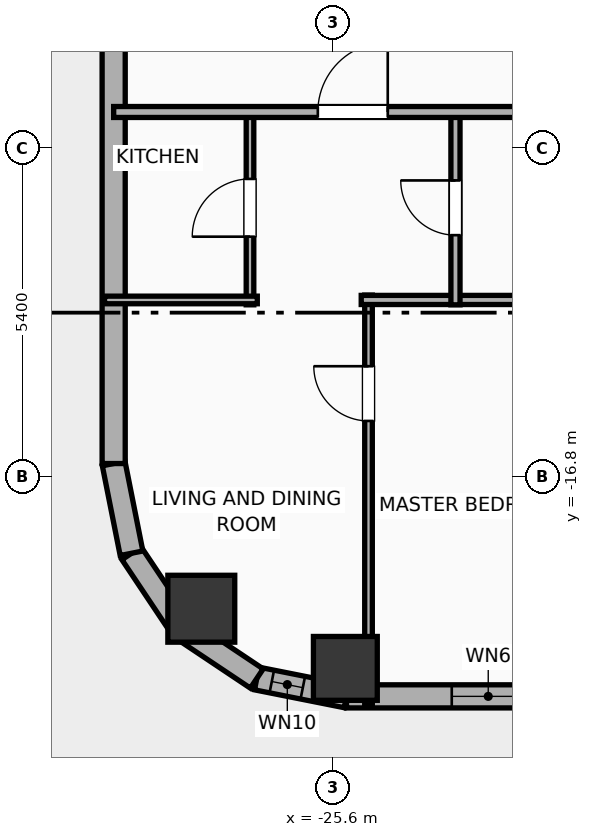
"""IFC4 building model, lengths in metres.
Left out: names, types, materials, properties, quantities, classifications, styles, units other than length and angle.
Written with IfcOpenShell. Run it as: python <this file> out.ifc"""

import sys

from ifc_helpers import new_model, si_unit, direction, frame, frame_2d, origin, origin_2d, place, context, subcontext, project, spatial, rectangle, hollow_rectangle, hollow_circle, extrude, element, fill, save


model = new_model("IFC4")
c1 = context("Model", 3, precision=1e-05, world=origin(), true_north=direction((0.0, 1.0)))
c2 = subcontext(c1, "Body", "Model", "MODEL_VIEW")
j1 = project(units=[si_unit("LENGTHUNIT", "METRE"), si_unit("PLANEANGLEUNIT", "RADIAN")], contexts=[c1])
p1 = place(None, origin())
s1 = spatial("IfcSite", under=j1, at=p1, CompositionType="ELEMENT")
p2 = place(p1, origin())
s2 = spatial("IfcBuilding", under=s1, at=p2, CompositionType="ELEMENT")
p3 = place(p2, frame((0.0, 0.0, 85.8)))
s3 = spatial("IfcBuildingStorey", under=s2, at=p3, CompositionType="ELEMENT", Elevation=85.8)
p4 = place(p3, frame((-25.4, -19.95, -0.4), z_axis=(0.0, 0.0, 1.0), x_axis=(1.0, 0.0, 0.0)))
e1 = element("IfcColumn", 1, at=p4, inside=s3, PredefinedType="COLUMN", context=c2, shape_type="SweptSolid", body=[
    extrude(hollow_rectangle(XDim=1.05, YDim=1.05, WallThickness=0.036, at=origin_2d()), origin(), (0.0, 0.0, 1.0), 4.3),
])
p5 = place(p3, frame((-27.769, -18.969, -0.4), z_axis=(0.0, 0.0, 1.0), x_axis=(1.0, 0.0, 0.0)))
e2 = element("IfcColumn", 2, at=p5, inside=s3, PredefinedType="COLUMN", context=c2, shape_type="SweptSolid", body=[
    extrude(hollow_circle(Radius=0.55, WallThickness=0.036, at=origin_2d()), origin(), (0.0, 0.0, 1.0), 4.3),
])
p6 = place(p3, frame((29.381, -20.41, 0.0), z_axis=(0.0, 0.0, 1.0), x_axis=(-1.0, 0.0, 0.0)))
e3 = element("IfcWall", 3, at=p6, inside=s3, PredefinedType="ELEMENTEDWALL", context=c2, shape_type="SweptSolid", body=[
    extrude(rectangle(XDim=54.763, YDim=0.38, at=frame_2d((27.381, 0.0))), origin(), (0.0, 0.0, 1.0), 2.54),
])
p7 = place(p6, frame((18.486, 0.0, 0.75)))
e4 = element("IfcOpeningElement", 4, at=p7, cuts=e3, PredefinedType="OPENING", context=c2, shape_type="SweptSolid", body=[
    extrude(rectangle(XDim=2.4, YDim=1.45, at=frame_2d((1.2, 0.725))), frame((0.0, 0.2, 0.0), z_axis=(0.0, -1.0, 0.0), x_axis=(1.0, 0.0, 0.0)), (0.0, 0.0, 1.0), 0.4),
])
p8 = place(p6, frame((47.567, 0.0, 0.75)))
e5 = element("IfcOpeningElement", 5, at=p8, cuts=e3, PredefinedType="OPENING", context=c2, shape_type="SweptSolid", body=[
    extrude(rectangle(XDim=2.4, YDim=1.45, at=frame_2d((1.2, 0.725))), frame((0.0, 0.2, 0.0), z_axis=(0.0, -1.0, 0.0), x_axis=(1.0, 0.0, 0.0)), (0.0, 0.0, 1.0), 0.4),
])
p9 = place(p6, frame((7.464, 0.0, 0.0)))
e6 = element("IfcOpeningElement", 6, at=p9, cuts=e3, PredefinedType="OPENING", context=c2, shape_type="SweptSolid", body=[
    extrude(rectangle(XDim=1.5, YDim=2.05, at=frame_2d((0.75, 1.025))), frame((0.0, 0.2, 0.0), z_axis=(0.0, -1.0, 0.0), x_axis=(1.0, 0.0, 0.0)), (0.0, 0.0, 1.0), 0.4),
])
p10 = place(p6, frame((51.831, 0.0, 0.55)))
e7 = element("IfcOpeningElement", 7, at=p10, cuts=e3, PredefinedType="OPENING", context=c2, shape_type="SweptSolid", body=[
    extrude(rectangle(XDim=1.2, YDim=1.15, at=frame_2d((0.6, 0.575))), frame((0.0, 0.2, 0.0), z_axis=(0.0, -1.0, 0.0), x_axis=(1.0, 0.0, 0.0)), (0.0, 0.0, 1.0), 0.4),
])
p11 = place(p6, frame((44.606, 0.0, 0.55)))
e8 = element("IfcOpeningElement", 8, at=p11, cuts=e3, PredefinedType="OPENING", context=c2, shape_type="SweptSolid", body=[
    extrude(rectangle(XDim=1.2, YDim=1.15, at=frame_2d((0.6, 0.575))), frame((0.0, 0.2, 0.0), z_axis=(0.0, -1.0, 0.0), x_axis=(1.0, 0.0, 0.0)), (0.0, 0.0, 1.0), 0.4),
])
p12 = place(p6, frame((38.906, 0.0, 0.55)))
e9 = element("IfcOpeningElement", 9, at=p12, cuts=e3, PredefinedType="OPENING", context=c2, shape_type="SweptSolid", body=[
    extrude(rectangle(XDim=1.2, YDim=1.15, at=frame_2d((0.6, 0.575))), frame((0.0, 0.2, 0.0), z_axis=(0.0, -1.0, 0.0), x_axis=(1.0, 0.0, 0.0)), (0.0, 0.0, 1.0), 0.4),
])
p13 = place(p6, frame((41.656, 0.0, 0.55)))
e10 = element("IfcOpeningElement", 10, at=p13, cuts=e3, PredefinedType="OPENING", context=c2, shape_type="SweptSolid", body=[
    extrude(rectangle(XDim=1.2, YDim=1.15, at=frame_2d((0.6, 0.575))), frame((0.0, 0.2, 0.0), z_axis=(0.0, -1.0, 0.0), x_axis=(1.0, 0.0, 0.0)), (0.0, 0.0, 1.0), 0.4),
])
p14 = place(p6, frame((33.666, 0.0, 0.55)))
e11 = element("IfcOpeningElement", 11, at=p14, cuts=e3, PredefinedType="OPENING", context=c2, shape_type="SweptSolid", body=[
    extrude(rectangle(XDim=1.2, YDim=1.15, at=frame_2d((0.6, 0.575))), frame((0.0, 0.2, 0.0), z_axis=(0.0, -1.0, 0.0), x_axis=(1.0, 0.0, 0.0)), (0.0, 0.0, 1.0), 0.4),
])
p15 = place(p6, frame((36.176, 0.0, 0.55)))
e12 = element("IfcOpeningElement", 12, at=p15, cuts=e3, PredefinedType="OPENING", context=c2, shape_type="SweptSolid", body=[
    extrude(rectangle(XDim=1.2, YDim=1.15, at=frame_2d((0.6, 0.575))), frame((0.0, 0.2, 0.0), z_axis=(0.0, -1.0, 0.0), x_axis=(1.0, 0.0, 0.0)), (0.0, 0.0, 1.0), 0.4),
])
p16 = place(p6, frame((27.861, 0.0, 0.55)))
e13 = element("IfcOpeningElement", 13, at=p16, cuts=e3, PredefinedType="OPENING", context=c2, shape_type="SweptSolid", body=[
    extrude(rectangle(XDim=1.2, YDim=1.15, at=frame_2d((0.6, 0.575))), frame((0.0, 0.2, 0.0), z_axis=(0.0, -1.0, 0.0), x_axis=(1.0, 0.0, 0.0)), (0.0, 0.0, 1.0), 0.4),
])
p17 = place(p6, frame((30.611, 0.0, 0.55)))
e14 = element("IfcOpeningElement", 14, at=p17, cuts=e3, PredefinedType="OPENING", context=c2, shape_type="SweptSolid", body=[
    extrude(rectangle(XDim=1.2, YDim=1.15, at=frame_2d((0.6, 0.575))), frame((0.0, 0.2, 0.0), z_axis=(0.0, -1.0, 0.0), x_axis=(1.0, 0.0, 0.0)), (0.0, 0.0, 1.0), 0.4),
])
p18 = place(p6, frame((23.531, 0.0, 0.55)))
e15 = element("IfcOpeningElement", 15, at=p18, cuts=e3, PredefinedType="OPENING", context=c2, shape_type="SweptSolid", body=[
    extrude(rectangle(XDim=1.2, YDim=1.15, at=frame_2d((0.6, 0.575))), frame((0.0, 0.2, 0.0), z_axis=(0.0, -1.0, 0.0), x_axis=(1.0, 0.0, 0.0)), (0.0, 0.0, 1.0), 0.4),
])
p19 = place(p6, frame((16.386, 0.0, 0.55)))
e16 = element("IfcOpeningElement", 16, at=p19, cuts=e3, PredefinedType="OPENING", context=c2, shape_type="SweptSolid", body=[
    extrude(rectangle(XDim=1.2, YDim=1.15, at=frame_2d((0.6, 0.575))), frame((0.0, 0.2, 0.0), z_axis=(0.0, -1.0, 0.0), x_axis=(1.0, 0.0, 0.0)), (0.0, 0.0, 1.0), 0.4),
])
p20 = place(p6, frame((12.531, 0.0, 0.55)))
e17 = element("IfcOpeningElement", 17, at=p20, cuts=e3, PredefinedType="OPENING", context=c2, shape_type="SweptSolid", body=[
    extrude(rectangle(XDim=1.2, YDim=1.15, at=frame_2d((0.6, 0.575))), frame((0.0, 0.2, 0.0), z_axis=(0.0, -1.0, 0.0), x_axis=(1.0, 0.0, 0.0)), (0.0, 0.0, 1.0), 0.4),
])
p21 = place(p6, frame((4.377, 0.0, 0.55)))
e18 = element("IfcOpeningElement", 18, at=p21, cuts=e3, PredefinedType="OPENING", context=c2, shape_type="SweptSolid", body=[
    extrude(rectangle(XDim=1.2, YDim=1.15, at=frame_2d((0.6, 0.575))), frame((0.0, 0.2, 0.0), z_axis=(0.0, -1.0, 0.0), x_axis=(1.0, 0.0, 0.0)), (0.0, 0.0, 1.0), 0.4),
])
p22 = place(p6, frame((1.481, 0.0, 0.55)))
e19 = element("IfcOpeningElement", 19, at=p22, cuts=e3, PredefinedType="OPENING", context=c2, shape_type="SweptSolid", body=[
    extrude(rectangle(XDim=1.2, YDim=1.15, at=frame_2d((0.6, 0.575))), frame((0.0, 0.2, 0.0), z_axis=(0.0, -1.0, 0.0), x_axis=(1.0, 0.0, 0.0)), (0.0, 0.0, 1.0), 0.4),
])
p23 = place(p3, frame((-25.381, -20.41, 0.0), z_axis=(0.0, 0.0, 1.0), x_axis=(-0.980786132421, 0.195086038585, 0.0)))
e20 = element("IfcWall", 20, at=p23, inside=s3, PredefinedType="ELEMENTEDWALL", context=c2, shape_type="SweptSolid", body=[
    extrude(rectangle(XDim=1.504, YDim=0.38, at=frame_2d((0.752, 0.0))), origin(), (0.0, 0.0, 1.0), 2.54),
])
p24 = place(p23, frame((0.732, 0.0, 0.55)))
e21 = element("IfcOpeningElement", 21, at=p24, cuts=e20, PredefinedType="OPENING", context=c2, shape_type="SweptSolid", body=[
    extrude(rectangle(XDim=0.52, YDim=1.15, at=frame_2d((0.26, 0.575))), frame((0.0, 0.2, 0.0), z_axis=(0.0, -1.0, 0.0), x_axis=(1.0, 0.0, 0.0)), (0.0, 0.0, 1.0), 0.4),
])
p25 = place(p3, frame((-26.857, -20.116, 0.0), z_axis=(0.0, 0.0, 1.0), x_axis=(-0.831468045563, 0.555572577804, 0.0)))
e22 = element("IfcWall", 22, at=p25, inside=s3, PredefinedType="ELEMENTEDWALL", context=c2, shape_type="SweptSolid", body=[
    extrude(rectangle(XDim=1.485, YDim=0.38, at=frame_2d((0.742, 0.0))), origin(), (0.0, 0.0, 1.0), 2.54),
])
p26 = place(p3, frame((-28.091, -19.292, 0.0), z_axis=(0.0, 0.0, 1.0), x_axis=(-0.555610286119, 0.831442848281, 0.0)))
e23 = element("IfcWall", 23, at=p26, inside=s3, PredefinedType="ELEMENTEDWALL", context=c2, shape_type="SweptSolid", body=[
    extrude(rectangle(XDim=1.485, YDim=0.38, at=frame_2d((0.743, 0.0))), origin(), (0.0, 0.0, 1.0), 3.65),
])
p27 = place(p3, frame((-28.917, -18.057, 0.0), z_axis=(0.0, 0.0, 1.0), x_axis=(-0.195086038585, 0.980786132421, 0.0)))
e24 = element("IfcWall", 24, at=p27, inside=s3, PredefinedType="ELEMENTEDWALL", context=c2, shape_type="SweptSolid", body=[
    extrude(rectangle(XDim=1.504, YDim=0.38, at=frame_2d((0.752, 0.0))), origin(), (0.0, 0.0, 1.0), 3.65),
])
p28 = place(p3, frame((-29.21, -16.581, 0.0), z_axis=(0.0, 0.0, 1.0), x_axis=(0.0, 1.0, 0.0)))
e25 = element("IfcWall", 25, at=p28, inside=s3, PredefinedType="ELEMENTEDWALL", context=c2, shape_type="SweptSolid", body=[
    extrude(rectangle(XDim=34.363, YDim=0.38, at=frame_2d((17.181, 0.0))), origin(), (0.0, 0.0, 1.0), 2.54),
])
p29 = place(p28, frame((31.437, 0.0, 0.55)))
e26 = element("IfcOpeningElement", 26, at=p29, cuts=e25, PredefinedType="OPENING", context=c2, shape_type="SweptSolid", body=[
    extrude(rectangle(XDim=1.2, YDim=1.15, at=frame_2d((0.6, 0.575))), frame((0.0, 0.2, 0.0), z_axis=(0.0, -1.0, 0.0), x_axis=(1.0, 0.0, 0.0)), (0.0, 0.0, 1.0), 0.4),
])
p30 = place(p28, frame((21.976, 0.0, 0.55)))
e27 = element("IfcOpeningElement", 27, at=p30, cuts=e25, PredefinedType="OPENING", context=c2, shape_type="SweptSolid", body=[
    extrude(rectangle(XDim=1.2, YDim=1.15, at=frame_2d((0.6, 0.575))), frame((0.0, 0.2, 0.0), z_axis=(0.0, -1.0, 0.0), x_axis=(1.0, 0.0, 0.0)), (0.0, 0.0, 1.0), 0.4),
])
p31 = place(p28, frame((10.561, 0.0, 0.55)))
e28 = element("IfcOpeningElement", 28, at=p31, cuts=e25, PredefinedType="OPENING", context=c2, shape_type="SweptSolid", body=[
    extrude(rectangle(XDim=1.2, YDim=1.15, at=frame_2d((0.6, 0.575))), frame((0.0, 0.2, 0.0), z_axis=(0.0, -1.0, 0.0), x_axis=(1.0, 0.0, 0.0)), (0.0, 0.0, 1.0), 0.4),
])
p32 = place(p3, frame((-25.019, -20.56, 0.0), z_axis=(0.0, 0.0, 1.0), x_axis=(0.0, 1.0, 0.0)))
e29 = element("IfcWall", 29, at=p32, inside=s3, PredefinedType="PARTITIONING", context=c2, shape_type="SweptSolid", body=[
    extrude(rectangle(XDim=6.749, YDim=0.125, at=frame_2d((3.375, 0.0))), origin(), (0.0, 0.0, 1.0), 3.65),
])
p33 = place(p32, frame((4.679, 0.0, 0.0)))
e30 = element("IfcOpeningElement", 30, at=p33, cuts=e29, PredefinedType="OPENING", context=c2, shape_type="SweptSolid", body=[
    extrude(rectangle(XDim=0.9, YDim=2.05, at=frame_2d((0.45, 1.025))), frame((0.0, 0.073, 0.0), z_axis=(0.0, -1.0, 0.0), x_axis=(1.0, 0.0, 0.0)), (0.0, 0.0, 1.0), 0.145),
])
p34 = place(p3, frame((-25.139, -13.891, 0.0), z_axis=(0.0, 0.0, 1.0), x_axis=(1.0, 0.0, 0.0)))
e31 = element("IfcWall", 31, at=p34, inside=s3, PredefinedType="PLUMBINGWALL", context=c2, shape_type="SweptSolid", body=[
    extrude(rectangle(XDim=3.79, YDim=0.15, at=frame_2d((1.895, 0.0))), origin(), (0.0, 0.0, 1.0), 3.65),
])
p35 = place(p3, frame((-26.968, -13.971, 0.0), z_axis=(0.0, 0.0, 1.0), x_axis=(0.0, 1.0, 0.0)))
e32 = element("IfcWall", 32, at=p35, inside=s3, PredefinedType="PARTITIONING", context=c2, shape_type="SweptSolid", body=[
    extrude(rectangle(XDim=3.191, YDim=0.125, at=frame_2d((1.595, 0.0))), origin(), (0.0, 0.0, 1.0), 3.65),
])
p36 = place(p35, frame((1.121, 0.0, 0.0)))
e33 = element("IfcOpeningElement", 33, at=p36, cuts=e32, PredefinedType="OPENING", context=c2, shape_type="SweptSolid", body=[
    extrude(rectangle(XDim=0.95, YDim=2.05, at=frame_2d((0.475, 1.025))), frame((0.0, 0.073, 0.0), z_axis=(0.0, -1.0, 0.0), x_axis=(1.0, 0.0, 0.0)), (0.0, 0.0, 1.0), 0.145),
])
p37 = place(p3, frame((-29.36, -13.891, 0.0), z_axis=(0.0, 0.0, 1.0), x_axis=(1.0, 0.0, 0.0)))
e34 = element("IfcWall", 34, at=p37, inside=s3, PredefinedType="PARTITIONING", context=c2, shape_type="SweptSolid", body=[
    extrude(rectangle(XDim=2.512, YDim=0.125, at=frame_2d((1.256, 0.0))), origin(), (0.0, 0.0, 1.0), 3.65),
])
p38 = place(p3, frame((-23.589, -13.971, 0.0), z_axis=(0.0, 0.0, 1.0), x_axis=(0.0, 1.0, 0.0)))
e35 = element("IfcWall", 35, at=p38, inside=s3, PredefinedType="PLUMBINGWALL", context=c2, shape_type="SweptSolid", body=[
    extrude(rectangle(XDim=3.191, YDim=0.15, at=frame_2d((1.595, 0.0))), origin(), (0.0, 0.0, 1.0), 3.65),
])
p39 = place(p38, frame((1.146, 0.0, 0.0)))
e36 = element("IfcOpeningElement", 36, at=p39, cuts=e35, PredefinedType="OPENING", context=c2, shape_type="SweptSolid", body=[
    extrude(rectangle(XDim=0.9, YDim=2.05, at=frame_2d((0.45, 1.025))), frame((0.0, 0.085, 0.0), z_axis=(0.0, -1.0, 0.0), x_axis=(1.0, 0.0, 0.0)), (0.0, 0.0, 1.0), 0.17),
])
p40 = place(p3, frame((-29.21, -10.8, 0.0), z_axis=(0.0, 0.0, 1.0), x_axis=(1.0, 0.0, 0.0)))
e37 = element("IfcWall", 37, at=p40, inside=s3, PredefinedType="PARTITIONING", context=c2, shape_type="SweptSolid", body=[
    extrude(rectangle(XDim=62.42, YDim=0.18, at=frame_2d((31.21, 0.0))), origin(), (0.0, 0.0, 1.0), 3.65),
])
p41 = place(p40, frame((3.357, 0.0, 0.0)))
e38 = element("IfcOpeningElement", 38, at=p41, cuts=e37, PredefinedType="OPENING", context=c2, shape_type="SweptSolid", body=[
    extrude(rectangle(XDim=1.15, YDim=2.05, at=frame_2d((0.575, 1.025))), frame((0.0, 0.1, 0.0), z_axis=(0.0, -1.0, 0.0), x_axis=(1.0, 0.0, 0.0)), (0.0, 0.0, 1.0), 0.2),
])
p42 = place(p40, frame((10.998, 0.0, 0.0)))
e39 = element("IfcOpeningElement", 39, at=p42, cuts=e37, PredefinedType="OPENING", context=c2, shape_type="SweptSolid", body=[
    extrude(rectangle(XDim=1.15, YDim=2.05, at=frame_2d((0.575, 1.025))), frame((0.0, 0.1, 0.0), z_axis=(0.0, -1.0, 0.0), x_axis=(1.0, 0.0, 0.0)), (0.0, 0.0, 1.0), 0.2),
])
p43 = place(p40, frame((18.482, 0.0, 0.0)))
e40 = element("IfcOpeningElement", 40, at=p43, cuts=e37, PredefinedType="OPENING", context=c2, shape_type="SweptSolid", body=[
    extrude(rectangle(XDim=1.15, YDim=2.05, at=frame_2d((0.575, 1.025))), frame((0.0, 0.1, 0.0), z_axis=(0.0, -1.0, 0.0), x_axis=(1.0, 0.0, 0.0)), (0.0, 0.0, 1.0), 0.2),
])
p44 = place(p40, frame((23.962, 0.0, 0.0)))
e41 = element("IfcOpeningElement", 41, at=p44, cuts=e37, PredefinedType="OPENING", context=c2, shape_type="SweptSolid", body=[
    extrude(rectangle(XDim=1.15, YDim=2.05, at=frame_2d((0.575, 1.025))), frame((0.0, 0.1, 0.0), z_axis=(0.0, -1.0, 0.0), x_axis=(1.0, 0.0, 0.0)), (0.0, 0.0, 1.0), 0.2),
])
p45 = place(p40, frame((29.524, 0.0, 0.0)))
e42 = element("IfcOpeningElement", 42, at=p45, cuts=e37, PredefinedType="OPENING", context=c2, shape_type="SweptSolid", body=[
    extrude(rectangle(XDim=1.15, YDim=2.05, at=frame_2d((0.575, 1.025))), frame((0.0, 0.1, 0.0), z_axis=(0.0, -1.0, 0.0), x_axis=(1.0, 0.0, 0.0)), (0.0, 0.0, 1.0), 0.2),
])
p46 = place(p40, frame((34.218, 0.0, 0.0)))
e43 = element("IfcOpeningElement", 43, at=p46, cuts=e37, PredefinedType="OPENING", context=c2, shape_type="SweptSolid", body=[
    extrude(rectangle(XDim=0.9, YDim=2.05, at=frame_2d((0.45, 1.025))), frame((0.0, 0.1, 0.0), z_axis=(0.0, -1.0, 0.0), x_axis=(1.0, 0.0, 0.0)), (0.0, 0.0, 1.0), 0.2),
])
p47 = place(p40, frame((38.313, 0.0, 0.0)))
e44 = element("IfcOpeningElement", 44, at=p47, cuts=e37, PredefinedType="OPENING", context=c2, shape_type="SweptSolid", body=[
    extrude(rectangle(XDim=1.15, YDim=2.05, at=frame_2d((0.575, 1.025))), frame((0.0, 0.1, 0.0), z_axis=(0.0, -1.0, 0.0), x_axis=(1.0, 0.0, 0.0)), (0.0, 0.0, 1.0), 0.2),
])
p48 = place(p40, frame((45.223, 0.0, 0.0)))
e45 = element("IfcOpeningElement", 45, at=p48, cuts=e37, PredefinedType="OPENING", context=c2, shape_type="SweptSolid", body=[
    extrude(rectangle(XDim=0.9, YDim=2.05, at=frame_2d((0.45, 1.025))), frame((0.0, 0.1, 0.0), z_axis=(0.0, -1.0, 0.0), x_axis=(1.0, 0.0, 0.0)), (0.0, 0.0, 1.0), 0.2),
])
p49 = place(p40, frame((51.352, 0.0, 0.0)))
e46 = element("IfcOpeningElement", 46, at=p49, cuts=e37, PredefinedType="OPENING", context=c2, shape_type="SweptSolid", body=[
    extrude(rectangle(XDim=1.15, YDim=2.05, at=frame_2d((0.575, 1.025))), frame((0.0, 0.1, 0.0), z_axis=(0.0, -1.0, 0.0), x_axis=(1.0, 0.0, 0.0)), (0.0, 0.0, 1.0), 0.2),
])
p50 = place(p40, frame((58.493, 0.0, 0.0)))
e47 = element("IfcOpeningElement", 47, at=p50, cuts=e37, PredefinedType="OPENING", context=c2, shape_type="SweptSolid", body=[
    extrude(rectangle(XDim=1.15, YDim=2.05, at=frame_2d((0.575, 1.025))), frame((0.0, 0.1, 0.0), z_axis=(0.0, -1.0, 0.0), x_axis=(1.0, 0.0, 0.0)), (0.0, 0.0, 1.0), 0.2),
])
p51 = place(p24, origin())
e48 = element("IfcWindow", 48, at=p51, inside=s3, PartitioningType="SINGLE_PANEL", PredefinedType="WINDOW", context=c2, shape_type="SweptSolid", body=[
    extrude(rectangle(XDim=0.52, YDim=1.15, at=frame_2d((0.26, 0.575))), frame((0.0, 0.03, 0.0), z_axis=(0.0, -1.0, 0.0), x_axis=(1.0, 0.0, 0.0)), (0.0, 0.0, 1.0), 0.06),
])
fill(e21, e48)
p52 = place(p10, origin())
e49 = element("IfcWindow", 49, at=p52, inside=s3, PartitioningType="SINGLE_PANEL", PredefinedType="WINDOW", context=c2, shape_type="SweptSolid", body=[
    extrude(rectangle(XDim=1.2, YDim=1.15, at=frame_2d((0.6, 0.575))), frame((0.0, 0.03, 0.0), z_axis=(0.0, -1.0, 0.0), x_axis=(1.0, 0.0, 0.0)), (0.0, 0.0, 1.0), 0.06),
])
fill(e7, e49)
p53 = place(p33, origin())
e50 = element("IfcDoor", 50, at=p53, inside=s3, OperationType="SINGLE_SWING_RIGHT", PredefinedType="DOOR", context=c2, shape_type="SweptSolid", body=[
    extrude(rectangle(XDim=0.9, YDim=2.05, at=frame_2d((0.45, 1.025))), frame((0.0, 0.025, 0.0), z_axis=(0.0, -1.0, 0.0), x_axis=(1.0, 0.0, 0.0)), (0.0, 0.0, 1.0), 0.05),
])
fill(e30, e50)
p54 = place(p36, origin())
e51 = element("IfcDoor", 51, at=p54, inside=s3, OperationType="SINGLE_SWING_LEFT", PredefinedType="DOOR", context=c2, shape_type="SweptSolid", body=[
    extrude(rectangle(XDim=0.95, YDim=2.05, at=frame_2d((0.475, 1.025))), frame((0.0, 0.025, 0.0), z_axis=(0.0, -1.0, 0.0), x_axis=(1.0, 0.0, 0.0)), (0.0, 0.0, 1.0), 0.05),
])
fill(e33, e51)
p55 = place(p39, origin())
e52 = element("IfcDoor", 52, at=p55, inside=s3, OperationType="SINGLE_SWING_RIGHT", PredefinedType="DOOR", context=c2, shape_type="SweptSolid", body=[
    extrude(rectangle(XDim=0.9, YDim=2.05, at=frame_2d((0.45, 1.025))), frame((0.0, 0.025, 0.0), z_axis=(0.0, -1.0, 0.0), x_axis=(1.0, 0.0, 0.0)), (0.0, 0.0, 1.0), 0.05),
])
fill(e36, e52)
p56 = place(p41, origin())
e53 = element("IfcDoor", 53, at=p56, inside=s3, OperationType="SINGLE_SWING_RIGHT", PredefinedType="DOOR", context=c2, shape_type="SweptSolid", body=[
    extrude(rectangle(XDim=1.15, YDim=2.05, at=frame_2d((0.575, 1.025))), frame((0.0, 0.025, 0.0), z_axis=(0.0, -1.0, 0.0), x_axis=(1.0, 0.0, 0.0)), (0.0, 0.0, 1.0), 0.05),
])
fill(e38, e53)
save(model, sys.argv[1])
